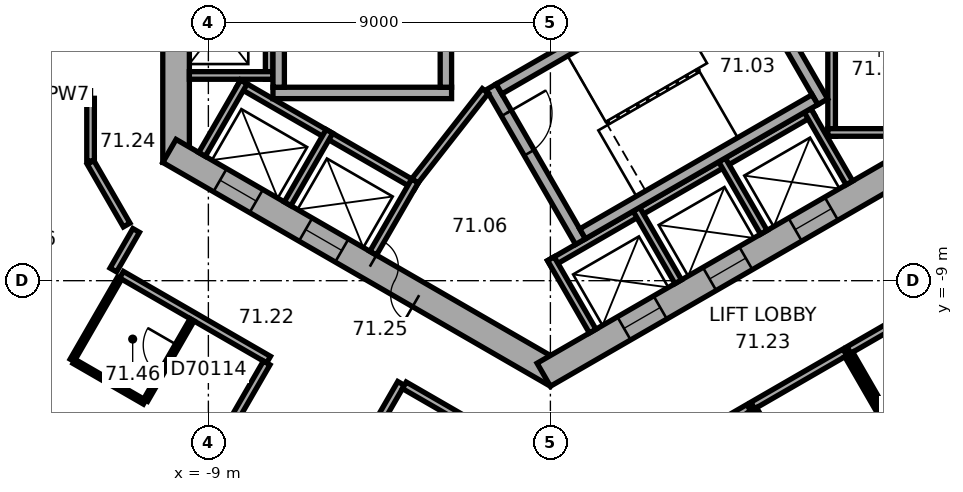
"""IFC4 building model, lengths in metres.
Left out: names, types, materials, properties, quantities, classifications, styles, units other than length and angle.
Written with IfcOpenShell. Run it as: python <this file> out.ifc"""

import sys

from ifc_helpers import new_model, si_unit, direction, frame, frame_2d, origin, place, context, subcontext, project, spatial, rectangle, extrude, element, fill, save


model = new_model("IFC4")
c1 = context("Model", 3, precision=1e-05, world=origin(), true_north=direction((0.0, 1.0)))
c2 = subcontext(c1, "Body", "Model", "MODEL_VIEW")
j1 = project(units=[si_unit("LENGTHUNIT", "METRE"), si_unit("PLANEANGLEUNIT", "RADIAN")], contexts=[c1])
p1 = place(None, origin())
s1 = spatial("IfcSite", under=j1, at=p1, CompositionType="ELEMENT")
p2 = place(p1, origin())
s2 = spatial("IfcBuilding", under=s1, at=p2, CompositionType="ELEMENT")
p3 = place(p2, frame((0.0, 0.0, 289.4)))
s3 = spatial("IfcBuildingStorey", under=s2, at=p3, CompositionType="ELEMENT", Elevation=289.4)
p4 = place(p3, frame((-9.85, 5.889, 0.0), z_axis=(0.0, 0.0, 1.0), x_axis=(0.0, -1.0, 0.0)))
e1 = element("IfcWall", 1, at=p4, inside=s3, PredefinedType="SHEAR", context=c2, shape_type="SweptSolid", body=[
    extrude(rectangle(XDim=11.778, YDim=0.7, at=frame_2d((5.889, 0.0))), origin(), (0.0, 0.0, 1.0), 3.7),
])
p5 = place(p4, frame((5.039, 0.0, 0.0)))
e2 = element("IfcOpeningElement", 2, at=p5, cuts=e1, PredefinedType="OPENING", context=c2, shape_type="SweptSolid", body=[
    extrude(rectangle(XDim=1.1, YDim=2.1, at=frame_2d((0.55, 1.05))), frame((0.0, 0.36, 0.0), z_axis=(0.0, -1.0, 0.0), x_axis=(1.0, 0.0, 0.0)), (0.0, 0.0, 1.0), 0.72),
])
p6 = place(p4, frame((7.639, 0.0, 0.0)))
e3 = element("IfcOpeningElement", 3, at=p6, cuts=e1, PredefinedType="OPENING", context=c2, shape_type="SweptSolid", body=[
    extrude(rectangle(XDim=1.1, YDim=2.1, at=frame_2d((0.55, 1.05))), frame((0.0, 0.36, 0.0), z_axis=(0.0, -1.0, 0.0), x_axis=(1.0, 0.0, 0.0)), (0.0, 0.0, 1.0), 0.72),
])
p7 = place(p3, frame((-10.025, -5.586, 0.0), z_axis=(0.0, 0.0, 1.0), x_axis=(0.866026453023, -0.499998182661, 0.0)))
e4 = element("IfcWall", 4, at=p7, inside=s3, PredefinedType="SHEAR", context=c2, shape_type="SweptSolid", body=[
    extrude(rectangle(XDim=11.778, YDim=0.7, at=frame_2d((5.889, 0.0))), origin(), (0.0, 0.0, 1.0), 3.7),
])
p8 = place(p7, frame((6.089, 0.0, 0.0)))
e5 = element("IfcOpeningElement", 5, at=p8, cuts=e4, PredefinedType="OPENING", context=c2, shape_type="SweptSolid", body=[
    extrude(rectangle(XDim=1.5, YDim=2.1, at=frame_2d((0.75, 1.05))), frame((0.0, 0.36, 0.0), z_axis=(0.0, -1.0, 0.0), x_axis=(1.0, 0.0, 0.0)), (0.0, 0.0, 1.0), 0.72),
])
p9 = place(p7, frame((1.539, 0.0, 0.0)))
e6 = element("IfcOpeningElement", 6, at=p9, cuts=e4, PredefinedType="OPENING", context=c2, shape_type="SweptSolid", body=[
    extrude(rectangle(XDim=1.1, YDim=2.1, at=frame_2d((0.55, 1.05))), frame((0.0, 0.36, 0.0), z_axis=(0.0, -1.0, 0.0), x_axis=(1.0, 0.0, 0.0)), (0.0, 0.0, 1.0), 0.72),
])
p10 = place(p7, frame((4.139, 0.0, 0.0)))
e7 = element("IfcOpeningElement", 7, at=p10, cuts=e4, PredefinedType="OPENING", context=c2, shape_type="SweptSolid", body=[
    extrude(rectangle(XDim=1.1, YDim=2.1, at=frame_2d((0.55, 1.05))), frame((0.0, 0.36, 0.0), z_axis=(0.0, -1.0, 0.0), x_axis=(1.0, 0.0, 0.0)), (0.0, 0.0, 1.0), 0.72),
])
p11 = place(p3, frame((-0.175, -11.475, 0.0), z_axis=(0.0, 0.0, 1.0), x_axis=(0.866026453023, 0.499998182661, 0.0)))
e8 = element("IfcWall", 8, at=p11, inside=s3, PredefinedType="SHEAR", context=c2, shape_type="SweptSolid", body=[
    extrude(rectangle(XDim=11.778, YDim=0.7, at=frame_2d((5.889, 0.0))), origin(), (0.0, 0.0, 1.0), 3.7),
])
p12 = place(p11, frame((2.439, 0.0, 0.0)))
e9 = element("IfcOpeningElement", 9, at=p12, cuts=e8, PredefinedType="OPENING", context=c2, shape_type="SweptSolid", body=[
    extrude(rectangle(XDim=1.1, YDim=2.1, at=frame_2d((0.55, 1.05))), frame((0.0, 0.36, 0.0), z_axis=(0.0, -1.0, 0.0), x_axis=(1.0, 0.0, 0.0)), (0.0, 0.0, 1.0), 0.72),
])
p13 = place(p11, frame((5.039, 0.0, 0.0)))
e10 = element("IfcOpeningElement", 10, at=p13, cuts=e8, PredefinedType="OPENING", context=c2, shape_type="SweptSolid", body=[
    extrude(rectangle(XDim=1.1, YDim=2.1, at=frame_2d((0.55, 1.05))), frame((0.0, 0.36, 0.0), z_axis=(0.0, -1.0, 0.0), x_axis=(1.0, 0.0, 0.0)), (0.0, 0.0, 1.0), 0.72),
])
p14 = place(p11, frame((7.639, 0.0, 0.0)))
e11 = element("IfcOpeningElement", 11, at=p14, cuts=e8, PredefinedType="OPENING", context=c2, shape_type="SweptSolid", body=[
    extrude(rectangle(XDim=1.1, YDim=2.1, at=frame_2d((0.55, 1.05))), frame((0.0, 0.36, 0.0), z_axis=(0.0, -1.0, 0.0), x_axis=(1.0, 0.0, 0.0)), (0.0, 0.0, 1.0), 0.72),
])
p15 = place(p3, frame((2.58, -21.377, 0.0), z_axis=(0.0, 0.0, 1.0), x_axis=(0.833888592176, 0.551932800112, 0.0)))
e12 = element("IfcWall", 12, at=p15, inside=s3, PredefinedType="STANDARD", context=c2, shape_type="SweptSolid", body=[
    extrude(rectangle(XDim=17.731, YDim=0.2, at=frame_2d((8.866, 0.0))), origin(), (0.0, 0.0, 1.0), 3.7),
])
p16 = place(p15, frame((1.202, 0.0, 0.9)))
e13 = element("IfcOpeningElement", 13, at=p16, cuts=e12, PredefinedType="OPENING", context=c2, shape_type="SweptSolid", body=[
    extrude(rectangle(XDim=2.0, YDim=2.0, at=frame_2d((1.0, 1.0))), frame((0.0, 0.11, 0.0), z_axis=(0.0, -1.0, 0.0), x_axis=(1.0, 0.0, 0.0)), (0.0, 0.0, 1.0), 0.22),
])
p17 = place(p15, frame((4.533, 0.0, 0.9)))
e14 = element("IfcOpeningElement", 14, at=p17, cuts=e12, PredefinedType="OPENING", context=c2, shape_type="SweptSolid", body=[
    extrude(rectangle(XDim=2.0, YDim=2.0, at=frame_2d((1.0, 1.0))), frame((0.0, 0.11, 0.0), z_axis=(0.0, -1.0, 0.0), x_axis=(1.0, 0.0, 0.0)), (0.0, 0.0, 1.0), 0.22),
])
p18 = place(p15, frame((7.865, 0.0, 0.9)))
e15 = element("IfcOpeningElement", 15, at=p18, cuts=e12, PredefinedType="OPENING", context=c2, shape_type="SweptSolid", body=[
    extrude(rectangle(XDim=2.0, YDim=2.0, at=frame_2d((1.0, 1.0))), frame((0.0, 0.11, 0.0), z_axis=(0.0, -1.0, 0.0), x_axis=(1.0, 0.0, 0.0)), (0.0, 0.0, 1.0), 0.22),
])
p19 = place(p15, frame((11.197, 0.0, 0.9)))
e16 = element("IfcOpeningElement", 16, at=p19, cuts=e12, PredefinedType="OPENING", context=c2, shape_type="SweptSolid", body=[
    extrude(rectangle(XDim=2.0, YDim=2.0, at=frame_2d((1.0, 1.0))), frame((0.0, 0.11, 0.0), z_axis=(0.0, -1.0, 0.0), x_axis=(1.0, 0.0, 0.0)), (0.0, 0.0, 1.0), 0.22),
])
p20 = place(p15, frame((14.528, 0.0, 0.9)))
e17 = element("IfcOpeningElement", 17, at=p20, cuts=e12, PredefinedType="OPENING", context=c2, shape_type="SweptSolid", body=[
    extrude(rectangle(XDim=2.0, YDim=2.0, at=frame_2d((1.0, 1.0))), frame((0.0, 0.11, 0.0), z_axis=(0.0, -1.0, 0.0), x_axis=(1.0, 0.0, 0.0)), (0.0, 0.0, 1.0), 0.22),
])
p21 = place(p3, frame((7.4, -5.2, 0.0), z_axis=(0.0, 0.0, 1.0), x_axis=(0.0, 1.0, 0.0)))
e18 = element("IfcWall", 18, at=p21, inside=s3, PredefinedType="PARTITIONING", context=c2, shape_type="SweptSolid", body=[
    extrude(rectangle(XDim=5.4, YDim=0.2, at=frame_2d((2.7, 0.0))), origin(), (0.0, 0.0, 1.0), 3.42),
])
p22 = place(p3, frame((7.3, -5.1, 0.0), z_axis=(0.0, 0.0, 1.0), x_axis=(1.0, 0.0, 0.0)))
e19 = element("IfcWall", 19, at=p22, inside=s3, PredefinedType="PARTITIONING", context=c2, shape_type="SweptSolid", body=[
    extrude(rectangle(XDim=2.2, YDim=0.2, at=frame_2d((1.1, 0.0))), origin(), (0.0, 0.0, 1.0), 3.42),
])
p23 = place(p3, frame((-7.4, 4.3, 0.0), z_axis=(0.0, 0.0, 1.0), x_axis=(0.0, -1.0, 0.0)))
e20 = element("IfcWall", 20, at=p23, inside=s3, PredefinedType="PARTITIONING", context=c2, shape_type="SweptSolid", body=[
    extrude(rectangle(XDim=8.0, YDim=0.2, at=frame_2d((4.0, 0.0))), origin(), (0.0, 0.0, 1.0), 3.42),
])
p24 = place(p3, frame((-7.3, -3.6, 0.0), z_axis=(0.0, 0.0, 1.0), x_axis=(-1.0, 0.0, 0.0)))
e21 = element("IfcWall", 21, at=p24, inside=s3, PredefinedType="PARTITIONING", context=c2, shape_type="SweptSolid", body=[
    extrude(rectangle(XDim=2.2, YDim=0.2, at=frame_2d((1.1, 0.0))), origin(), (0.0, 0.0, 1.0), 3.42),
])
p25 = place(p3, frame((-8.203, -3.809, 0.0), z_axis=(0.0, 0.0, 1.0), x_axis=(0.866028230842, -0.499995103361, 0.0)))
e22 = element("IfcWall", 22, at=p25, inside=s3, PredefinedType="PARTITIONING", context=c2, shape_type="SweptSolid", body=[
    extrude(rectangle(XDim=5.4, YDim=0.2, at=frame_2d((2.7, 0.0))), origin(), (0.0, 0.0, 1.0), 3.42),
])
for number, where, z_axis, x_axis in (
    (23, (-8.067, -3.772, 0.0), (0.0, 0.0, 1.0), (-0.5, -0.866, 0.0)),
    (24, (-5.815, -5.072, 0.0), (0.0, 0.0, 1.0), (-0.5, -0.866, 0.0)),
):
    element("IfcWall", number, at=place(p3, frame(where, z_axis=z_axis, x_axis=x_axis)), inside=s3, PredefinedType="PARTITIONING", context=c2, shape_type="SweptSolid", body=[
        extrude(rectangle(XDim=2.2, YDim=0.2, at=frame_2d((1.1, 0.0))), origin(), (0.0, 0.0, 1.0), 3.42),
    ])
p26 = place(p3, frame((-3.563, -6.372, 0.0), z_axis=(0.0, 0.0, 1.0), x_axis=(-0.499994660107, -0.866028486751, 0.0)))
e25 = element("IfcWall", 25, at=p26, inside=s3, PredefinedType="PARTITIONING", context=c2, shape_type="SweptSolid", body=[
    extrude(rectangle(XDim=2.2, YDim=0.2, at=frame_2d((1.1, 0.0))), origin(), (0.0, 0.0, 1.0), 3.42),
])
p27 = place(p3, frame((-0.024, -8.559, 0.0), z_axis=(0.0, 0.0, 1.0), x_axis=(0.866026010844, 0.49999894854, 0.0)))
e26 = element("IfcWall", 26, at=p27, inside=s3, PredefinedType="PARTITIONING", context=c2, shape_type="SweptSolid", body=[
    extrude(rectangle(XDim=8.0, YDim=0.2, at=frame_2d((4.0, 0.0))), origin(), (0.0, 0.0, 1.0), 3.42),
])
for number, where, z_axis, x_axis in (
    (27, (0.013, -8.422, 0.0), (0.0, 0.0, 1.0), (0.5, -0.866, 0.0)),
    (28, (2.264, -7.122, 0.0), (0.0, 0.0, 1.0), (0.5, -0.866, 0.0)),
    (29, (4.516, -5.822, 0.0), (0.0, 0.0, 1.0), (0.5, -0.866, 0.0)),
    (30, (6.768, -4.522, 0.0), (0.0, 0.0, 1.0), (0.5, -0.866, 0.0)),
):
    element("IfcWall", number, at=place(p3, frame(where, z_axis=z_axis, x_axis=x_axis)), inside=s3, PredefinedType="PARTITIONING", context=c2, shape_type="SweptSolid", body=[
        extrude(rectangle(XDim=2.2, YDim=0.2, at=frame_2d((1.1, 0.0))), origin(), (0.0, 0.0, 1.0), 3.42),
    ])
p28 = place(p3, frame((-2.6, -4.06, 0.0), z_axis=(0.0, 0.0, 1.0), x_axis=(-1.0, 0.0, 0.0)))
e31 = element("IfcWall", 31, at=p28, inside=s3, PredefinedType="SHEAR", context=c2, shape_type="SweptSolid", body=[
    extrude(rectangle(XDim=4.7, YDim=0.3, at=frame_2d((2.35, 0.0))), origin(), (0.0, 0.0, 1.0), 3.42),
])
for number, where, z_axis, x_axis in (
    (32, (-2.75, 3.15, 0.0), (0.0, 0.0, 1.0), (0.0, -1.0, 0.0)),
    (33, (-7.15, 3.15, 0.0), (0.0, 0.0, 1.0), (0.0, -1.0, 0.0)),
):
    element("IfcWall", number, at=place(p3, frame(where, z_axis=z_axis, x_axis=x_axis)), inside=s3, PredefinedType="SHEAR", context=c2, shape_type="SweptSolid", body=[
        extrude(rectangle(XDim=7.06, YDim=0.3, at=frame_2d((3.53, 0.0))), origin(), (0.0, 0.0, 1.0), 3.42),
    ])
p29 = place(p3, frame((-1.558, -3.902, 0.0), z_axis=(0.0, 0.0, 1.0), x_axis=(0.499977259774, -0.866038532462, 0.0)))
e34 = element("IfcWall", 34, at=p29, inside=s3, PredefinedType="SHEAR", context=c2, shape_type="SweptSolid", body=[
    extrude(rectangle(XDim=4.7, YDim=0.3, at=frame_2d((2.35, 0.0))), origin(), (0.0, 0.0, 1.0), 3.42),
])
p30 = place(p29, frame((0.8, 0.0, 0.0)))
e35 = element("IfcOpeningElement", 35, at=p30, cuts=e34, PredefinedType="OPENING", context=c2, shape_type="SweptSolid", body=[
    extrude(rectangle(XDim=1.2, YDim=2.1, at=frame_2d((0.6, 1.05))), frame((0.0, 0.16, 0.0), z_axis=(0.0, -1.0, 0.0), x_axis=(1.0, 0.0, 0.0)), (0.0, 0.0, 1.0), 0.32),
])
p31 = place(p3, frame((4.816, -0.222, 0.0), z_axis=(0.0, 0.0, 1.0), x_axis=(0.499977259774, -0.866038532462, 0.0)))
e36 = element("IfcWall", 36, at=p31, inside=s3, PredefinedType="SHEAR", context=c2, shape_type="SweptSolid", body=[
    extrude(rectangle(XDim=4.7, YDim=0.3, at=frame_2d((2.35, 0.0))), origin(), (0.0, 0.0, 1.0), 3.42),
])
for number, where, z_axis, x_axis in (
    (37, (-1.353, -3.957, 0.0), (0.0, 0.0, 1.0), (0.866, 0.5, 0.0)),
    (38, (0.847, -7.767, 0.0), (0.0, 0.0, 1.0), (0.866, 0.5, 0.0)),
):
    element("IfcWall", number, at=place(p3, frame(where, z_axis=z_axis, x_axis=x_axis)), inside=s3, PredefinedType="SHEAR", context=c2, shape_type="SweptSolid", body=[
        extrude(rectangle(XDim=7.06, YDim=0.3, at=frame_2d((3.53, 0.0))), origin(), (0.0, 0.0, 1.0), 3.42),
    ])
p32 = place(p3, frame((-1.712, -4.008, 0.0), z_axis=(0.0, 0.0, 1.0), x_axis=(-0.616549420702, -0.787316208287, 0.0)))
e39 = element("IfcWall", 39, at=p32, inside=s3, PredefinedType="PARTITIONING", context=c2, shape_type="SweptSolid", body=[
    extrude(rectangle(XDim=3.002, YDim=0.2, at=frame_2d((1.501, 0.0))), origin(), (0.0, 0.0, 1.0), 3.42),
])
p33 = place(p3, frame((-13.301, -4.101, 0.0), z_axis=(0.0, 0.0, 1.0), x_axis=(1.0, 0.0, 0.0)))
e40 = element("IfcWall", 40, at=p33, inside=s3, PredefinedType="PARTITIONING", context=c2, shape_type="SweptSolid", body=[
    extrude(rectangle(XDim=1.201, YDim=0.2, at=frame_2d((0.601, 0.0))), origin(), (0.0, 0.0, 1.0), 3.42),
])
p34 = place(p3, frame((-12.585, -11.095, 0.0), z_axis=(0.0, 0.0, 1.0), x_axis=(0.500004234368, 0.866022959057, 0.0)))
e41 = element("IfcWall", 41, at=p34, inside=s3, PredefinedType="PARTITIONING", context=c2, shape_type="SweptSolid", body=[
    extrude(rectangle(XDim=2.5, YDim=0.12, at=frame_2d((1.25, 0.0))), origin(), (0.0, 0.0, 1.0), 3.42),
])
p35 = place(p3, frame((-12.1, -5.889, 0.0), z_axis=(0.0, 0.0, 1.0), x_axis=(0.500063520245, -0.865988727248, 0.0)))
e42 = element("IfcWall", 42, at=p35, inside=s3, PredefinedType="PARTITIONING", context=c2, shape_type="SweptSolid", body=[
    extrude(rectangle(XDim=1.9, YDim=0.2, at=frame_2d((0.95, 0.0))), origin(), (0.0, 0.0, 1.0), 3.42),
])
p36 = place(p3, frame((-12.1, -4.201, 0.0), z_axis=(0.0, 0.0, 1.0), x_axis=(0.0, -1.0, 0.0)))
e43 = element("IfcWall", 43, at=p36, inside=s3, PredefinedType="PARTITIONING", context=c2, shape_type="SweptSolid", body=[
    extrude(rectangle(XDim=1.648, YDim=0.2, at=frame_2d((0.824, 0.0))), origin(), (0.0, 0.0, 1.0), 3.42),
])
p37 = place(p3, frame((-11.285, -8.844, 0.0), z_axis=(0.0, 0.0, 1.0), x_axis=(0.866021785011, -0.500006267848, 0.0)))
e44 = element("IfcWall", 44, at=p37, inside=s3, PredefinedType="PARTITIONING", context=c2, shape_type="SweptSolid", body=[
    extrude(rectangle(XDim=4.468, YDim=0.2, at=frame_2d((2.234, 0.0))), origin(), (0.0, 0.0, 1.0), 3.42),
])
p38 = place(p3, frame((-10.901, -7.678, 0.0), z_axis=(0.0, 0.0, 1.0), x_axis=(-0.500074377092, -0.865982457891, 0.0)))
e45 = element("IfcWall", 45, at=p38, inside=s3, PredefinedType="PARTITIONING", context=c2, shape_type="SweptSolid", body=[
    extrude(rectangle(XDim=1.201, YDim=0.2, at=frame_2d((0.601, 0.0))), origin(), (0.0, 0.0, 1.0), 3.42),
])
p39 = place(p3, frame((-10.679, -12.195, 0.0), z_axis=(0.0, 0.0, 1.0), x_axis=(-0.866037418504, 0.499979189318, 0.0)))
e46 = element("IfcWall", 46, at=p39, inside=s3, PredefinedType="PARTITIONING", context=c2, shape_type="SweptSolid", body=[
    extrude(rectangle(XDim=2.14, YDim=0.12, at=frame_2d((1.07, 0.0))), origin(), (0.0, 0.0, 1.0), 3.42),
])
p40 = place(p3, frame((-9.99, -15.537, 0.0), z_axis=(0.0, 0.0, 1.0), x_axis=(0.499966611936, 0.866044679534, 0.0)))
e47 = element("IfcWall", 47, at=p40, inside=s3, PredefinedType="PARTITIONING", context=c2, shape_type="SweptSolid", body=[
    extrude(rectangle(XDim=5.049, YDim=0.2, at=frame_2d((2.524, 0.0))), origin(), (0.0, 0.0, 1.0), 2.87),
])
p41 = place(p40, frame((2.024, 0.0, 0.0)))
e48 = element("IfcOpeningElement", 48, at=p41, cuts=e47, PredefinedType="OPENING", context=c2, shape_type="SweptSolid", body=[
    extrude(rectangle(XDim=1.0, YDim=2.1, at=frame_2d((0.5, 1.05))), frame((0.0, 0.11, 0.0), z_axis=(0.0, -1.0, 0.0), x_axis=(1.0, 0.0, 0.0)), (0.0, 0.0, 1.0), 0.22),
])
p42 = place(p3, frame((-9.429, -10.03, 0.0), z_axis=(0.0, 0.0, 1.0), x_axis=(-0.500034220881, -0.866005645448, 0.0)))
e49 = element("IfcWall", 49, at=p42, inside=s3, PredefinedType="PARTITIONING", context=c2, shape_type="SweptSolid", body=[
    extrude(rectangle(XDim=2.44, YDim=0.12, at=frame_2d((1.22, 0.0))), origin(), (0.0, 0.0, 1.0), 3.42),
])
p43 = place(p42, frame((0.77, 0.0, 0.0)))
e50 = element("IfcOpeningElement", 50, at=p43, cuts=e49, PredefinedType="OPENING", context=c2, shape_type="SweptSolid", body=[
    extrude(rectangle(XDim=0.9, YDim=2.1, at=frame_2d((0.45, 1.05))), frame((0.0, 0.07, 0.0), z_axis=(0.0, -1.0, 0.0), x_axis=(1.0, 0.0, 0.0)), (0.0, 0.0, 1.0), 0.14),
])
p44 = place(p3, frame((-7.105, -17.202, 0.0), z_axis=(0.0, 0.0, 1.0), x_axis=(0.499988692146, 0.866031932279, 0.0)))
e51 = element("IfcWall", 51, at=p44, inside=s3, PredefinedType="PARTITIONING", context=c2, shape_type="SweptSolid", body=[
    extrude(rectangle(XDim=6.35, YDim=0.2, at=frame_2d((3.175, 0.0))), origin(), (0.0, 0.0, 1.0), 3.42),
])
p45 = place(p44, frame((2.675, 0.0, 0.0)))
e52 = element("IfcOpeningElement", 52, at=p45, cuts=e51, PredefinedType="OPENING", context=c2, shape_type="SweptSolid", body=[
    extrude(rectangle(XDim=1.0, YDim=2.1, at=frame_2d((0.5, 1.05))), frame((0.0, 0.11, 0.0), z_axis=(0.0, -1.0, 0.0), x_axis=(1.0, 0.0, 0.0)), (0.0, 0.0, 1.0), 0.22),
])
p46 = place(p3, frame((-3.843, -11.753, 0.0), z_axis=(0.0, 0.0, 1.0), x_axis=(0.866031037473, -0.499990242038, 0.0)))
e53 = element("IfcWall", 53, at=p46, inside=s3, PredefinedType="PARTITIONING", context=c2, shape_type="SweptSolid", body=[
    extrude(rectangle(XDim=3.341, YDim=0.2, at=frame_2d((1.67, 0.0))), origin(), (0.0, 0.0, 1.0), 3.42),
])
p47 = place(p3, frame((2.796, -13.744, 0.0), z_axis=(0.0, 0.0, 1.0), x_axis=(0.866034573852, 0.49998411664, 0.0)))
e54 = element("IfcWall", 54, at=p47, inside=s3, PredefinedType="PARTITIONING", context=c2, shape_type="SweptSolid", body=[
    extrude(rectangle(XDim=2.8, YDim=0.2, at=frame_2d((1.4, 0.0))), origin(), (0.0, 0.0, 1.0), 3.42),
])
p48 = place(p3, frame((5.271, -12.431, 0.0), z_axis=(0.0, 0.0, 1.0), x_axis=(0.500026960575, -0.86600983753, 0.0)))
e55 = element("IfcWall", 55, at=p48, inside=s3, PredefinedType="PARTITIONING", context=c2, shape_type="SweptSolid", body=[
    extrude(rectangle(XDim=3.1, YDim=0.12, at=frame_2d((1.55, 0.0))), origin(), (0.0, 0.0, 1.0), 3.42),
])
p49 = place(p3, frame((5.325, -12.284, 0.0), z_axis=(0.0, 0.0, 1.0), x_axis=(0.866034573852, 0.49998411664, 0.0)))
e56 = element("IfcWall", 56, at=p49, inside=s3, PredefinedType="PARTITIONING", context=c2, shape_type="SweptSolid", body=[
    extrude(rectangle(XDim=2.8, YDim=0.2, at=frame_2d((1.4, 0.0))), origin(), (0.0, 0.0, 1.0), 3.42),
])
p50 = place(p3, frame((6.925, -15.056, 0.0), z_axis=(0.0, 0.0, 1.0), x_axis=(-0.49999285859, 0.86602952684, 0.0)))
e57 = element("IfcWall", 57, at=p50, inside=s3, PredefinedType="PARTITIONING", context=c2, shape_type="SweptSolid", body=[
    extrude(rectangle(XDim=3.1, YDim=0.12, at=frame_2d((1.55, 0.0))), origin(), (0.0, 0.0, 1.0), 2.87),
])
p51 = place(p3, frame((7.8, -10.971, 0.0), z_axis=(0.0, 0.0, 1.0), x_axis=(0.500026960575, -0.86600983753, 0.0)))
e58 = element("IfcWall", 58, at=p51, inside=s3, PredefinedType="PARTITIONING", context=c2, shape_type="SweptSolid", body=[
    extrude(rectangle(XDim=3.1, YDim=0.12, at=frame_2d((1.55, 0.0))), origin(), (0.0, 0.0, 1.0), 3.42),
])
p52 = place(p3, frame((7.854, -10.824, 0.0), z_axis=(0.0, 0.0, 1.0), x_axis=(0.866029675718, 0.499992600721, 0.0)))
e59 = element("IfcWall", 59, at=p52, inside=s3, PredefinedType="PARTITIONING", context=c2, shape_type="SweptSolid", body=[
    extrude(rectangle(XDim=2.712, YDim=0.2, at=frame_2d((1.356, 0.0))), origin(), (0.0, 0.0, 1.0), 3.42),
])
p53 = place(p3, frame((9.153, -13.076, 0.0), z_axis=(0.0, 0.0, 1.0), x_axis=(-0.500004234368, 0.866022959057, 0.0)))
e60 = element("IfcWall", 60, at=p53, inside=s3, PredefinedType="PARTITIONING", context=c2, shape_type="SweptSolid", body=[
    extrude(rectangle(XDim=2.5, YDim=0.12, at=frame_2d((1.25, 0.0))), origin(), (0.0, 0.0, 1.0), 3.42),
])
p54 = place(p8, origin())
e61 = element("IfcDoor", 61, at=p54, inside=s3, OperationType="DOUBLE_DOOR_SINGLE_SWING", PredefinedType="DOOR", context=c2, shape_type="SweptSolid", body=[
    extrude(rectangle(XDim=1.5, YDim=2.1, at=frame_2d((0.75, 1.05))), frame((0.0, 0.025, 0.0), z_axis=(0.0, -1.0, 0.0), x_axis=(1.0, 0.0, 0.0)), (0.0, 0.0, 1.0), 0.05),
])
fill(e5, e61)
p55 = place(p30, origin())
e62 = element("IfcDoor", 62, at=p55, inside=s3, OperationType="SINGLE_SWING_RIGHT", PredefinedType="DOOR", context=c2, shape_type="SweptSolid", body=[
    extrude(rectangle(XDim=1.2, YDim=2.1, at=frame_2d((0.6, 1.05))), frame((0.0, 0.025, 0.0), z_axis=(0.0, -1.0, 0.0), x_axis=(1.0, 0.0, 0.0)), (0.0, 0.0, 1.0), 0.05),
])
fill(e35, e62)
p56 = place(p9, origin())
e63 = element("IfcDoor", 63, at=p56, inside=s3, OperationType="DOUBLE_DOOR_SLIDING", PredefinedType="DOOR", context=c2, shape_type="SweptSolid", body=[
    extrude(rectangle(XDim=1.1, YDim=2.1, at=frame_2d((0.55, 1.05))), frame((0.0, 0.025, 0.0), z_axis=(0.0, -1.0, 0.0), x_axis=(1.0, 0.0, 0.0)), (0.0, 0.0, 1.0), 0.05),
])
fill(e6, e63)
p57 = place(p10, origin())
e64 = element("IfcDoor", 64, at=p57, inside=s3, OperationType="DOUBLE_DOOR_SLIDING", PredefinedType="DOOR", context=c2, shape_type="SweptSolid", body=[
    extrude(rectangle(XDim=1.1, YDim=2.1, at=frame_2d((0.55, 1.05))), frame((0.0, 0.025, 0.0), z_axis=(0.0, -1.0, 0.0), x_axis=(1.0, 0.0, 0.0)), (0.0, 0.0, 1.0), 0.05),
])
fill(e7, e64)
p58 = place(p12, origin())
e65 = element("IfcDoor", 65, at=p58, inside=s3, OperationType="DOUBLE_DOOR_SLIDING", PredefinedType="DOOR", context=c2, shape_type="SweptSolid", body=[
    extrude(rectangle(XDim=1.1, YDim=2.1, at=frame_2d((0.55, 1.05))), frame((0.0, 0.025, 0.0), z_axis=(0.0, -1.0, 0.0), x_axis=(1.0, 0.0, 0.0)), (0.0, 0.0, 1.0), 0.05),
])
fill(e9, e65)
p59 = place(p13, origin())
e66 = element("IfcDoor", 66, at=p59, inside=s3, OperationType="DOUBLE_DOOR_SLIDING", PredefinedType="DOOR", context=c2, shape_type="SweptSolid", body=[
    extrude(rectangle(XDim=1.1, YDim=2.1, at=frame_2d((0.55, 1.05))), frame((0.0, 0.025, 0.0), z_axis=(0.0, -1.0, 0.0), x_axis=(1.0, 0.0, 0.0)), (0.0, 0.0, 1.0), 0.05),
])
fill(e10, e66)
p60 = place(p14, origin())
e67 = element("IfcDoor", 67, at=p60, inside=s3, OperationType="DOUBLE_DOOR_SLIDING", PredefinedType="DOOR", context=c2, shape_type="SweptSolid", body=[
    extrude(rectangle(XDim=1.1, YDim=2.1, at=frame_2d((0.55, 1.05))), frame((0.0, 0.025, 0.0), z_axis=(0.0, -1.0, 0.0), x_axis=(1.0, 0.0, 0.0)), (0.0, 0.0, 1.0), 0.05),
])
fill(e11, e67)
p61 = place(p43, origin())
e68 = element("IfcDoor", 68, at=p61, inside=s3, OperationType="SINGLE_SWING_LEFT", PredefinedType="DOOR", context=c2, shape_type="SweptSolid", body=[
    extrude(rectangle(XDim=0.9, YDim=2.1, at=frame_2d((0.45, 1.05))), frame((0.0, 0.025, 0.0), z_axis=(0.0, -1.0, 0.0), x_axis=(1.0, 0.0, 0.0)), (0.0, 0.0, 1.0), 0.05),
])
fill(e50, e68)
save(model, sys.argv[1])
